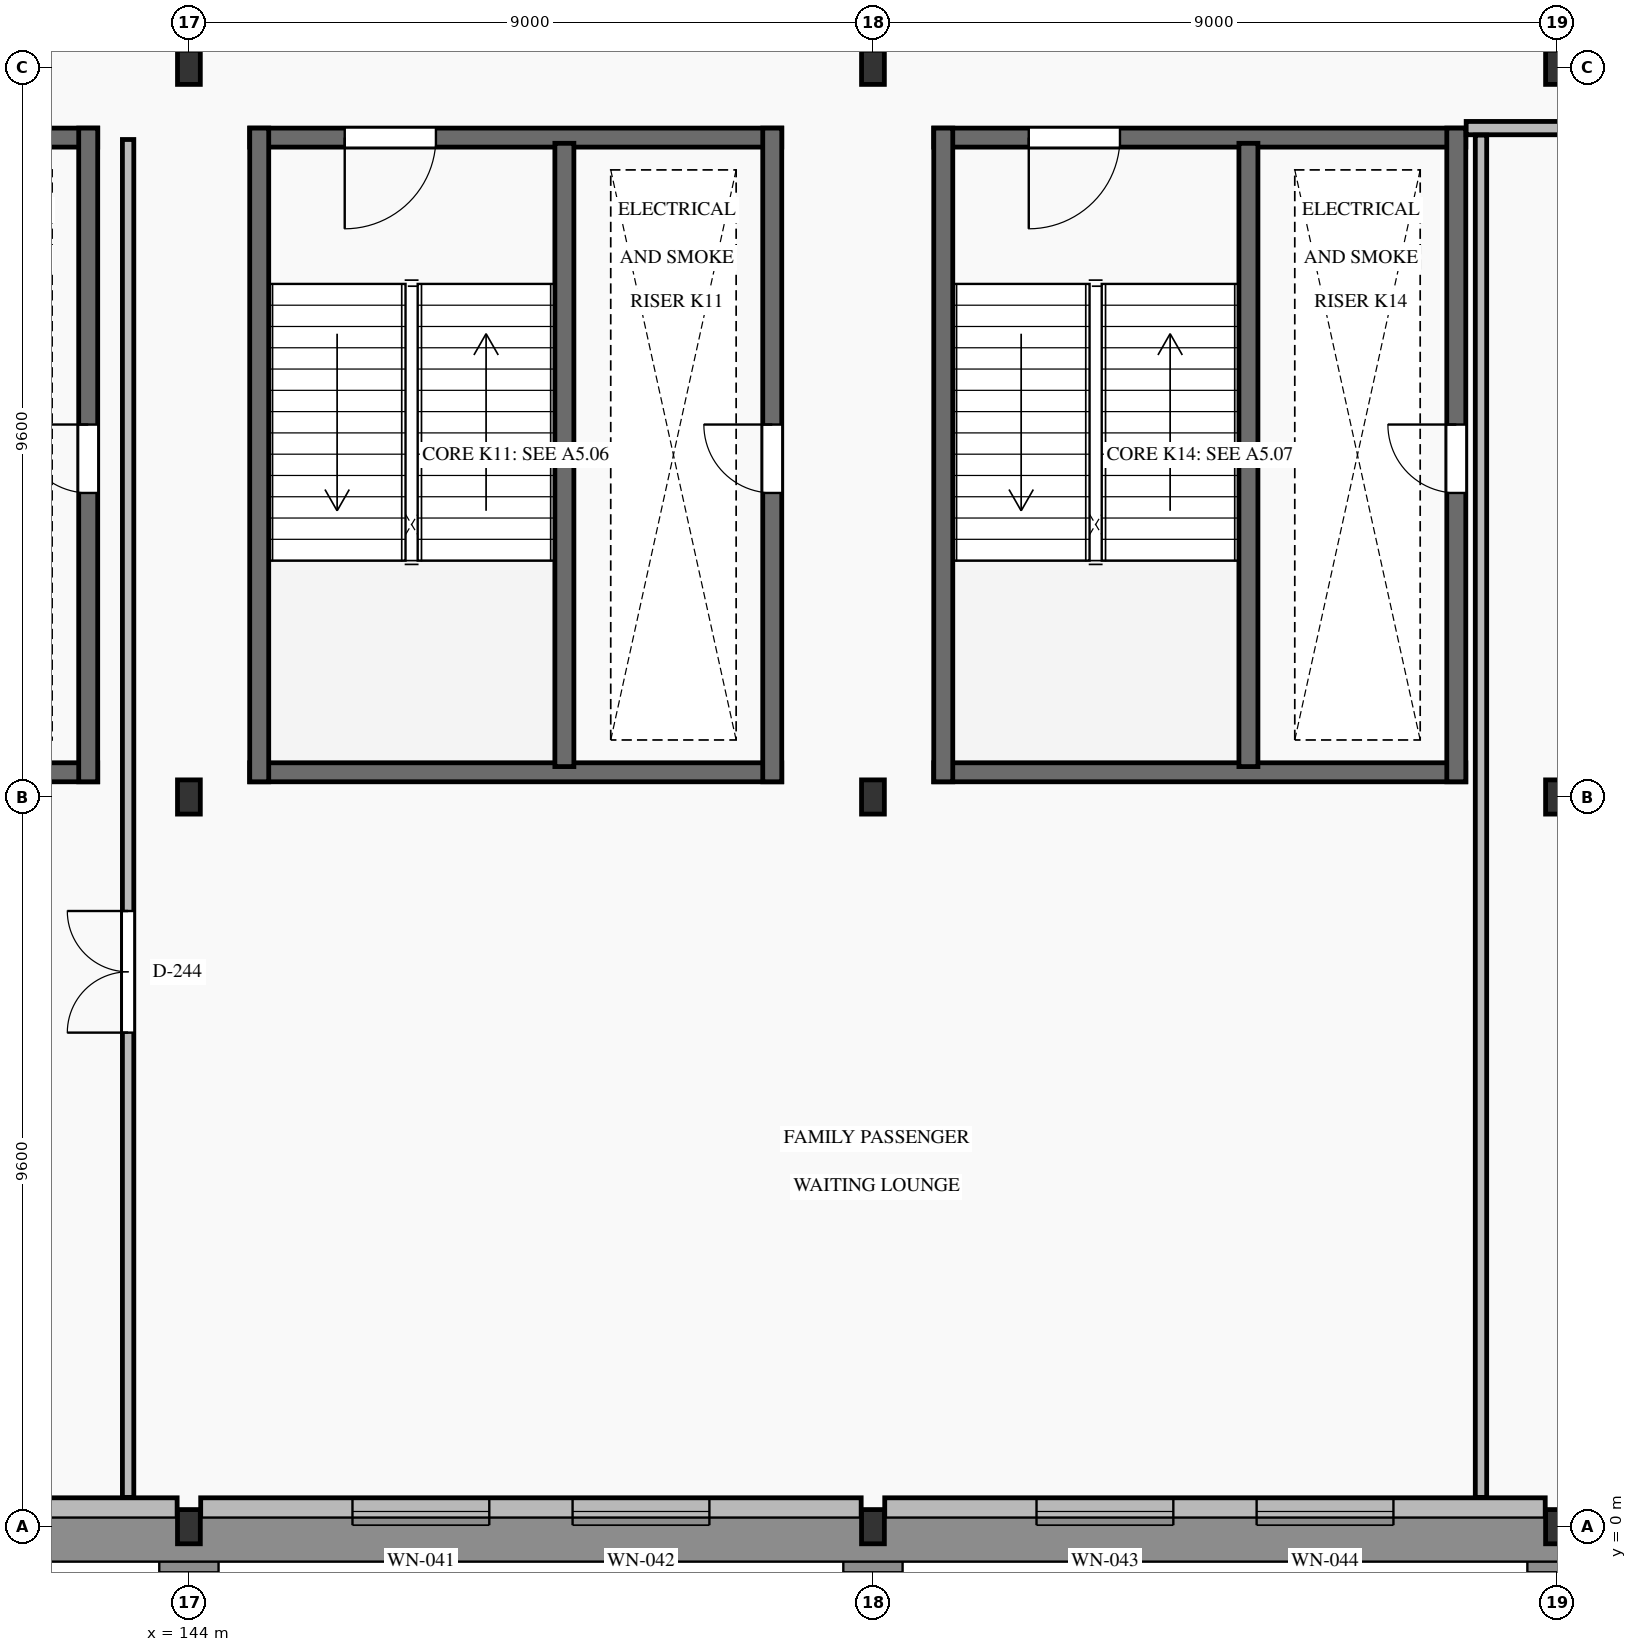
"""IFC4 building model, lengths in metres.
Left out: names, types, materials, properties, quantities, classifications, styles, units other than length and angle.
Written with IfcOpenShell. Run it as: python <this file> out.ifc"""

import sys

from ifc_helpers import new_model, si_unit, direction, frame, frame_2d, origin, origin_2d, place, context, subcontext, project, spatial, rectangle, i_section, extrude, element, fill, save


model = new_model("IFC4")
c1 = context("Model", 3, precision=1e-05, world=origin(), true_north=direction((0.0, 1.0)))
c2 = subcontext(c1, "Body", "Model", "MODEL_VIEW")
j1 = project(units=[si_unit("LENGTHUNIT", "METRE"), si_unit("PLANEANGLEUNIT", "RADIAN")], contexts=[c1])
p1 = place(None, origin())
s1 = spatial("IfcSite", under=j1, at=p1, CompositionType="ELEMENT")
p2 = place(p1, origin())
s2 = spatial("IfcBuilding", under=s1, at=p2, CompositionType="ELEMENT")
p3 = place(p2, frame((0.0, 0.0, 6.0)))
s3 = spatial("IfcBuildingStorey", under=s2, at=p3, CompositionType="ELEMENT", Elevation=6.0)
for number, where, z_axis, x_axis in (
    (1, (144.0, 0.0, 0.0), (0.0, 0.0, 1.0), (1.0, 0.0, 0.0)),
    (2, (144.0, 9.6, 0.0), (0.0, 0.0, 1.0), (1.0, 0.0, 0.0)),
    (3, (144.0, 19.2, 0.0), (0.0, 0.0, 1.0), (1.0, 0.0, 0.0)),
    (4, (153.0, 0.0, 0.0), (0.0, 0.0, 1.0), (1.0, 0.0, 0.0)),
    (5, (153.0, 9.6, 0.0), (0.0, 0.0, 1.0), (1.0, 0.0, 0.0)),
    (6, (153.0, 19.2, 0.0), (0.0, 0.0, 1.0), (1.0, 0.0, 0.0)),
    (7, (162.0, 0.0, 0.0), (0.0, 0.0, 1.0), (1.0, 0.0, 0.0)),
    (8, (162.0, 9.6, 0.0), (0.0, 0.0, 1.0), (1.0, 0.0, 0.0)),
    (9, (162.0, 19.2, 0.0), (0.0, 0.0, 1.0), (1.0, 0.0, 0.0)),
):
    element("IfcColumn", number, at=place(p3, frame(where, z_axis=z_axis, x_axis=x_axis)), inside=s3, PredefinedType="COLUMN", context=c2, shape_type="SweptSolid", body=[
        extrude(i_section(OverallWidth=0.3, OverallDepth=0.45, WebThickness=0.014, FlangeThickness=0.026, FilletRadius=0.027, at=origin_2d()), origin(), (0.0, 0.0, 1.0), 4.8),
    ])
p4 = place(p3, frame((135.155, 0.2, 0.0), z_axis=(0.0, 0.0, 1.0), x_axis=(1.0, 0.0, 0.0)))
e10 = element("IfcWall", 10, at=p4, inside=s3, PredefinedType="SOLIDWALL", context=c2, shape_type="SweptSolid", body=[
    extrude(rectangle(XDim=8.69, YDim=0.36, at=frame_2d((4.345, 0.0))), origin(), (0.0, 0.0, 1.0), 4.23),
])
p5 = place(p4, frame((1.997, 0.0, 0.95)))
e11 = element("IfcOpeningElement", 11, at=p5, cuts=e10, PredefinedType="OPENING", context=c2, shape_type="SweptSolid", body=[
    extrude(rectangle(XDim=1.8, YDim=2.2, at=frame_2d((0.9, 1.1))), frame((0.0, 0.195, 0.0), z_axis=(0.0, -1.0, 0.0), x_axis=(1.0, 0.0, 0.0)), (0.0, 0.0, 1.0), 0.39),
])
p6 = place(p4, frame((4.893, 0.0, 0.95)))
e12 = element("IfcOpeningElement", 12, at=p6, cuts=e10, PredefinedType="OPENING", context=c2, shape_type="SweptSolid", body=[
    extrude(rectangle(XDim=1.8, YDim=2.2, at=frame_2d((0.9, 1.1))), frame((0.0, 0.195, 0.0), z_axis=(0.0, -1.0, 0.0), x_axis=(1.0, 0.0, 0.0)), (0.0, 0.0, 1.0), 0.39),
])
p7 = place(p3, frame((144.155, 0.2, 0.0), z_axis=(0.0, 0.0, 1.0), x_axis=(1.0, 0.0, 0.0)))
e13 = element("IfcWall", 13, at=p7, inside=s3, PredefinedType="SOLIDWALL", context=c2, shape_type="SweptSolid", body=[
    extrude(rectangle(XDim=8.69, YDim=0.36, at=frame_2d((4.345, 0.0))), origin(), (0.0, 0.0, 1.0), 4.23),
])
p8 = place(p7, frame((1.997, 0.0, 0.95)))
e14 = element("IfcOpeningElement", 14, at=p8, cuts=e13, PredefinedType="OPENING", context=c2, shape_type="SweptSolid", body=[
    extrude(rectangle(XDim=1.8, YDim=2.2, at=frame_2d((0.9, 1.1))), frame((0.0, 0.195, 0.0), z_axis=(0.0, -1.0, 0.0), x_axis=(1.0, 0.0, 0.0)), (0.0, 0.0, 1.0), 0.39),
])
p9 = place(p7, frame((4.893, 0.0, 0.95)))
e15 = element("IfcOpeningElement", 15, at=p9, cuts=e13, PredefinedType="OPENING", context=c2, shape_type="SweptSolid", body=[
    extrude(rectangle(XDim=1.8, YDim=2.2, at=frame_2d((0.9, 1.1))), frame((0.0, 0.195, 0.0), z_axis=(0.0, -1.0, 0.0), x_axis=(1.0, 0.0, 0.0)), (0.0, 0.0, 1.0), 0.39),
])
p10 = place(p3, frame((153.155, 0.2, 0.0), z_axis=(0.0, 0.0, 1.0), x_axis=(1.0, 0.0, 0.0)))
e16 = element("IfcWall", 16, at=p10, inside=s3, PredefinedType="SOLIDWALL", context=c2, shape_type="SweptSolid", body=[
    extrude(rectangle(XDim=8.69, YDim=0.36, at=frame_2d((4.345, 0.0))), origin(), (0.0, 0.0, 1.0), 4.23),
])
p11 = place(p10, frame((1.997, 0.0, 0.95)))
e17 = element("IfcOpeningElement", 17, at=p11, cuts=e16, PredefinedType="OPENING", context=c2, shape_type="SweptSolid", body=[
    extrude(rectangle(XDim=1.8, YDim=2.2, at=frame_2d((0.9, 1.1))), frame((0.0, 0.195, 0.0), z_axis=(0.0, -1.0, 0.0), x_axis=(1.0, 0.0, 0.0)), (0.0, 0.0, 1.0), 0.39),
])
p12 = place(p10, frame((4.893, 0.0, 0.95)))
e18 = element("IfcOpeningElement", 18, at=p12, cuts=e16, PredefinedType="OPENING", context=c2, shape_type="SweptSolid", body=[
    extrude(rectangle(XDim=1.8, YDim=2.2, at=frame_2d((0.9, 1.1))), frame((0.0, 0.195, 0.0), z_axis=(0.0, -1.0, 0.0), x_axis=(1.0, 0.0, 0.0)), (0.0, 0.0, 1.0), 0.39),
])
p13 = place(p3, frame((135.8, 9.925, 0.0), z_axis=(0.0, 0.0, 1.0), x_axis=(1.0, 0.0, 0.0)))
e19 = element("IfcWall", 19, at=p13, inside=s3, PredefinedType="SHEAR", context=c2, shape_type="SweptSolid", body=[
    extrude(rectangle(XDim=7.0, YDim=0.25, at=frame_2d((3.5, 0.0))), origin(), (0.0, 0.0, 1.0), 4.8),
])
p14 = place(p3, frame((135.8, 18.275, 0.0), z_axis=(0.0, 0.0, 1.0), x_axis=(1.0, 0.0, 0.0)))
e20 = element("IfcWall", 20, at=p14, inside=s3, PredefinedType="SHEAR", context=c2, shape_type="SweptSolid", body=[
    extrude(rectangle(XDim=7.0, YDim=0.25, at=frame_2d((3.5, 0.0))), origin(), (0.0, 0.0, 1.0), 4.8),
])
p15 = place(p14, frame((1.25, 0.0, 0.0)))
e21 = element("IfcOpeningElement", 21, at=p15, cuts=e20, PredefinedType="OPENING", context=c2, shape_type="SweptSolid", body=[
    extrude(rectangle(XDim=1.2, YDim=2.15, at=frame_2d((0.6, 1.075))), frame((0.0, 0.14, 0.0), z_axis=(0.0, -1.0, 0.0), x_axis=(1.0, 0.0, 0.0)), (0.0, 0.0, 1.0), 0.28),
])
p16 = place(p3, frame((142.675, 9.8, 0.0), z_axis=(0.0, 0.0, 1.0), x_axis=(0.0, 1.0, 0.0)))
e22 = element("IfcWall", 22, at=p16, inside=s3, PredefinedType="SHEAR", context=c2, shape_type="SweptSolid", body=[
    extrude(rectangle(XDim=8.6, YDim=0.25, at=frame_2d((4.3, 0.0))), origin(), (0.0, 0.0, 1.0), 4.8),
])
p17 = place(p16, frame((3.8, 0.0, 0.0)))
e23 = element("IfcOpeningElement", 23, at=p17, cuts=e22, PredefinedType="OPENING", context=c2, shape_type="SweptSolid", body=[
    extrude(rectangle(XDim=0.9, YDim=2.05, at=frame_2d((0.45, 1.025))), frame((0.0, 0.14, 0.0), z_axis=(0.0, -1.0, 0.0), x_axis=(1.0, 0.0, 0.0)), (0.0, 0.0, 1.0), 0.28),
])
p18 = place(p3, frame((144.8, 9.925, 0.0), z_axis=(0.0, 0.0, 1.0), x_axis=(1.0, 0.0, 0.0)))
e24 = element("IfcWall", 24, at=p18, inside=s3, PredefinedType="SHEAR", context=c2, shape_type="SweptSolid", body=[
    extrude(rectangle(XDim=7.0, YDim=0.25, at=frame_2d((3.5, 0.0))), origin(), (0.0, 0.0, 1.0), 4.8),
])
p19 = place(p3, frame((144.8, 18.275, 0.0), z_axis=(0.0, 0.0, 1.0), x_axis=(1.0, 0.0, 0.0)))
e25 = element("IfcWall", 25, at=p19, inside=s3, PredefinedType="SHEAR", context=c2, shape_type="SweptSolid", body=[
    extrude(rectangle(XDim=7.0, YDim=0.25, at=frame_2d((3.5, 0.0))), origin(), (0.0, 0.0, 1.0), 4.8),
])
p20 = place(p19, frame((1.25, 0.0, 0.0)))
e26 = element("IfcOpeningElement", 26, at=p20, cuts=e25, PredefinedType="OPENING", context=c2, shape_type="SweptSolid", body=[
    extrude(rectangle(XDim=1.2, YDim=2.15, at=frame_2d((0.6, 1.075))), frame((0.0, 0.14, 0.0), z_axis=(0.0, -1.0, 0.0), x_axis=(1.0, 0.0, 0.0)), (0.0, 0.0, 1.0), 0.28),
])
p21 = place(p3, frame((144.925, 9.8, 0.0), z_axis=(0.0, 0.0, 1.0), x_axis=(0.0, 1.0, 0.0)))
e27 = element("IfcWall", 27, at=p21, inside=s3, PredefinedType="SHEAR", context=c2, shape_type="SweptSolid", body=[
    extrude(rectangle(XDim=8.6, YDim=0.25, at=frame_2d((4.3, 0.0))), origin(), (0.0, 0.0, 1.0), 4.8),
])
p22 = place(p3, frame((151.675, 9.8, 0.0), z_axis=(0.0, 0.0, 1.0), x_axis=(0.0, 1.0, 0.0)))
e28 = element("IfcWall", 28, at=p22, inside=s3, PredefinedType="SHEAR", context=c2, shape_type="SweptSolid", body=[
    extrude(rectangle(XDim=8.6, YDim=0.25, at=frame_2d((4.3, 0.0))), origin(), (0.0, 0.0, 1.0), 4.8),
])
p23 = place(p22, frame((3.8, 0.0, 0.0)))
e29 = element("IfcOpeningElement", 29, at=p23, cuts=e28, PredefinedType="OPENING", context=c2, shape_type="SweptSolid", body=[
    extrude(rectangle(XDim=0.9, YDim=2.05, at=frame_2d((0.45, 1.025))), frame((0.0, 0.14, 0.0), z_axis=(0.0, -1.0, 0.0), x_axis=(1.0, 0.0, 0.0)), (0.0, 0.0, 1.0), 0.28),
])
p24 = place(p3, frame((148.94, 10.0, 0.0), z_axis=(0.0, 0.0, 1.0), x_axis=(0.0, 1.0, 0.0)))
e30 = element("IfcWall", 30, at=p24, inside=s3, PredefinedType="SHEAR", context=c2, shape_type="SweptSolid", body=[
    extrude(rectangle(XDim=8.2, YDim=0.25, at=frame_2d((4.1, 0.0))), origin(), (0.0, 0.0, 1.0), 4.8),
])
p25 = place(p3, frame((153.8, 9.925, 0.0), z_axis=(0.0, 0.0, 1.0), x_axis=(1.0, 0.0, 0.0)))
e31 = element("IfcWall", 31, at=p25, inside=s3, PredefinedType="SHEAR", context=c2, shape_type="SweptSolid", body=[
    extrude(rectangle(XDim=7.0, YDim=0.25, at=frame_2d((3.5, 0.0))), origin(), (0.0, 0.0, 1.0), 4.8),
])
p26 = place(p3, frame((153.8, 18.275, 0.0), z_axis=(0.0, 0.0, 1.0), x_axis=(1.0, 0.0, 0.0)))
e32 = element("IfcWall", 32, at=p26, inside=s3, PredefinedType="SHEAR", context=c2, shape_type="SweptSolid", body=[
    extrude(rectangle(XDim=7.0, YDim=0.25, at=frame_2d((3.5, 0.0))), origin(), (0.0, 0.0, 1.0), 4.8),
])
p27 = place(p26, frame((1.25, 0.0, 0.0)))
e33 = element("IfcOpeningElement", 33, at=p27, cuts=e32, PredefinedType="OPENING", context=c2, shape_type="SweptSolid", body=[
    extrude(rectangle(XDim=1.2, YDim=2.15, at=frame_2d((0.6, 1.075))), frame((0.0, 0.14, 0.0), z_axis=(0.0, -1.0, 0.0), x_axis=(1.0, 0.0, 0.0)), (0.0, 0.0, 1.0), 0.28),
])
p28 = place(p3, frame((153.925, 9.8, 0.0), z_axis=(0.0, 0.0, 1.0), x_axis=(0.0, 1.0, 0.0)))
e34 = element("IfcWall", 34, at=p28, inside=s3, PredefinedType="SHEAR", context=c2, shape_type="SweptSolid", body=[
    extrude(rectangle(XDim=8.6, YDim=0.25, at=frame_2d((4.3, 0.0))), origin(), (0.0, 0.0, 1.0), 4.8),
])
p29 = place(p3, frame((160.675, 9.8, 0.0), z_axis=(0.0, 0.0, 1.0), x_axis=(0.0, 1.0, 0.0)))
e35 = element("IfcWall", 35, at=p29, inside=s3, PredefinedType="SHEAR", context=c2, shape_type="SweptSolid", body=[
    extrude(rectangle(XDim=8.6, YDim=0.25, at=frame_2d((4.3, 0.0))), origin(), (0.0, 0.0, 1.0), 4.8),
])
p30 = place(p29, frame((3.8, 0.0, 0.0)))
e36 = element("IfcOpeningElement", 36, at=p30, cuts=e35, PredefinedType="OPENING", context=c2, shape_type="SweptSolid", body=[
    extrude(rectangle(XDim=0.9, YDim=2.05, at=frame_2d((0.45, 1.025))), frame((0.0, 0.14, 0.0), z_axis=(0.0, -1.0, 0.0), x_axis=(1.0, 0.0, 0.0)), (0.0, 0.0, 1.0), 0.28),
])
p31 = place(p3, frame((157.94, 10.0, 0.0), z_axis=(0.0, 0.0, 1.0), x_axis=(0.0, 1.0, 0.0)))
e37 = element("IfcWall", 37, at=p31, inside=s3, PredefinedType="SHEAR", context=c2, shape_type="SweptSolid", body=[
    extrude(rectangle(XDim=8.2, YDim=0.25, at=frame_2d((4.1, 0.0))), origin(), (0.0, 0.0, 1.0), 4.8),
])
p32 = place(p3, frame((143.2, 0.385, 0.0), z_axis=(0.0, 0.0, 1.0), x_axis=(0.0, 1.0, 0.0)))
e38 = element("IfcWall", 38, at=p32, inside=s3, PredefinedType="PARTITIONING", context=c2, shape_type="SweptSolid", body=[
    extrude(rectangle(XDim=17.865, YDim=0.15, at=frame_2d((8.933, 0.0))), origin(), (0.0, 0.0, 1.0), 4.53),
])
p33 = place(p32, frame((6.115, 0.0, 0.0)))
e39 = element("IfcOpeningElement", 39, at=p33, cuts=e38, PredefinedType="OPENING", context=c2, shape_type="SweptSolid", body=[
    extrude(rectangle(XDim=1.6, YDim=2.25, at=frame_2d((0.8, 1.125))), frame((0.0, 0.09, 0.0), z_axis=(0.0, -1.0, 0.0), x_axis=(1.0, 0.0, 0.0)), (0.0, 0.0, 1.0), 0.18),
])
p34 = place(p3, frame((160.805, 18.4, 0.0), z_axis=(0.0, 0.0, 1.0), x_axis=(1.0, 0.0, 0.0)))
e40 = element("IfcWall", 40, at=p34, inside=s3, PredefinedType="PARTITIONING", context=c2, shape_type="SweptSolid", body=[
    extrude(rectangle(XDim=18.41, YDim=0.175, at=frame_2d((9.205, 0.0))), origin(), (0.0, 0.0, 1.0), 4.53),
])
p35 = place(p34, frame((6.495, 0.0, 0.0)))
e41 = element("IfcOpeningElement", 41, at=p35, cuts=e40, PredefinedType="OPENING", context=c2, shape_type="SweptSolid", body=[
    extrude(rectangle(XDim=1.8, YDim=2.3, at=frame_2d((0.9, 1.15))), frame((0.0, 0.103, 0.0), z_axis=(0.0, -1.0, 0.0), x_axis=(1.0, 0.0, 0.0)), (0.0, 0.0, 1.0), 0.205),
])
p36 = place(p3, frame((161.0, 0.385, 0.0), z_axis=(0.0, 0.0, 1.0), x_axis=(0.0, 1.0, 0.0)))
e42 = element("IfcWall", 42, at=p36, inside=s3, PredefinedType="PARTITIONING", context=c2, shape_type="SweptSolid", body=[
    extrude(rectangle(XDim=17.923, YDim=0.15, at=frame_2d((8.961, 0.0))), origin(), (0.0, 0.0, 1.0), 4.53),
])
p37 = place(p8, origin())
e43 = element("IfcWindow", 43, at=p37, inside=s3, PartitioningType="SINGLE_PANEL", PredefinedType="WINDOW", context=c2, shape_type="SweptSolid", body=[
    extrude(rectangle(XDim=1.8, YDim=2.2, at=frame_2d((0.9, 1.1))), frame((0.0, 0.03, 0.0), z_axis=(0.0, -1.0, 0.0), x_axis=(1.0, 0.0, 0.0)), (0.0, 0.0, 1.0), 0.06),
])
fill(e14, e43)
p38 = place(p9, origin())
e44 = element("IfcWindow", 44, at=p38, inside=s3, PartitioningType="SINGLE_PANEL", PredefinedType="WINDOW", context=c2, shape_type="SweptSolid", body=[
    extrude(rectangle(XDim=1.8, YDim=2.2, at=frame_2d((0.9, 1.1))), frame((0.0, 0.03, 0.0), z_axis=(0.0, -1.0, 0.0), x_axis=(1.0, 0.0, 0.0)), (0.0, 0.0, 1.0), 0.06),
])
fill(e15, e44)
p39 = place(p11, origin())
e45 = element("IfcWindow", 45, at=p39, inside=s3, PartitioningType="SINGLE_PANEL", PredefinedType="WINDOW", context=c2, shape_type="SweptSolid", body=[
    extrude(rectangle(XDim=1.8, YDim=2.2, at=frame_2d((0.9, 1.1))), frame((0.0, 0.03, 0.0), z_axis=(0.0, -1.0, 0.0), x_axis=(1.0, 0.0, 0.0)), (0.0, 0.0, 1.0), 0.06),
])
fill(e17, e45)
p40 = place(p12, origin())
e46 = element("IfcWindow", 46, at=p40, inside=s3, PartitioningType="SINGLE_PANEL", PredefinedType="WINDOW", context=c2, shape_type="SweptSolid", body=[
    extrude(rectangle(XDim=1.8, YDim=2.2, at=frame_2d((0.9, 1.1))), frame((0.0, 0.03, 0.0), z_axis=(0.0, -1.0, 0.0), x_axis=(1.0, 0.0, 0.0)), (0.0, 0.0, 1.0), 0.06),
])
fill(e18, e46)
p41 = place(p17, origin())
e47 = element("IfcDoor", 47, at=p41, inside=s3, OperationType="SINGLE_SWING_RIGHT", PredefinedType="DOOR", context=c2, shape_type="SweptSolid", body=[
    extrude(rectangle(XDim=0.9, YDim=2.05, at=frame_2d((0.45, 1.025))), frame((0.0, 0.025, 0.0), z_axis=(0.0, -1.0, 0.0), x_axis=(1.0, 0.0, 0.0)), (0.0, 0.0, 1.0), 0.05),
])
fill(e23, e47)
p42 = place(p20, frame((1.2, 0.0, 0.0), z_axis=(0.0, 0.0, 1.0), x_axis=(-1.0, 0.0, 0.0)))
e48 = element("IfcDoor", 48, at=p42, inside=s3, OperationType="SINGLE_SWING_LEFT", PredefinedType="DOOR", context=c2, shape_type="SweptSolid", body=[
    extrude(rectangle(XDim=1.2, YDim=2.15, at=frame_2d((0.6, 1.075))), frame((0.0, 0.025, 0.0), z_axis=(0.0, -1.0, 0.0), x_axis=(1.0, 0.0, 0.0)), (0.0, 0.0, 1.0), 0.05),
])
fill(e26, e48)
p43 = place(p23, origin())
e49 = element("IfcDoor", 49, at=p43, inside=s3, OperationType="SINGLE_SWING_RIGHT", PredefinedType="DOOR", context=c2, shape_type="SweptSolid", body=[
    extrude(rectangle(XDim=0.9, YDim=2.05, at=frame_2d((0.45, 1.025))), frame((0.0, 0.025, 0.0), z_axis=(0.0, -1.0, 0.0), x_axis=(1.0, 0.0, 0.0)), (0.0, 0.0, 1.0), 0.05),
])
fill(e29, e49)
p44 = place(p27, frame((1.2, 0.0, 0.0), z_axis=(0.0, 0.0, 1.0), x_axis=(-1.0, 0.0, 0.0)))
e50 = element("IfcDoor", 50, at=p44, inside=s3, OperationType="SINGLE_SWING_LEFT", PredefinedType="DOOR", context=c2, shape_type="SweptSolid", body=[
    extrude(rectangle(XDim=1.2, YDim=2.15, at=frame_2d((0.6, 1.075))), frame((0.0, 0.025, 0.0), z_axis=(0.0, -1.0, 0.0), x_axis=(1.0, 0.0, 0.0)), (0.0, 0.0, 1.0), 0.05),
])
fill(e33, e50)
p45 = place(p30, origin())
e51 = element("IfcDoor", 51, at=p45, inside=s3, OperationType="SINGLE_SWING_RIGHT", PredefinedType="DOOR", context=c2, shape_type="SweptSolid", body=[
    extrude(rectangle(XDim=0.9, YDim=2.05, at=frame_2d((0.45, 1.025))), frame((0.0, 0.025, 0.0), z_axis=(0.0, -1.0, 0.0), x_axis=(1.0, 0.0, 0.0)), (0.0, 0.0, 1.0), 0.05),
])
fill(e36, e51)
p46 = place(p33, origin())
e52 = element("IfcDoor", 52, at=p46, inside=s3, OperationType="DOUBLE_DOOR_SINGLE_SWING", PredefinedType="DOOR", context=c2, shape_type="SweptSolid", body=[
    extrude(rectangle(XDim=1.6, YDim=2.25, at=frame_2d((0.8, 1.125))), frame((0.0, 0.025, 0.0), z_axis=(0.0, -1.0, 0.0), x_axis=(1.0, 0.0, 0.0)), (0.0, 0.0, 1.0), 0.05),
])
fill(e39, e52)
save(model, sys.argv[1])
